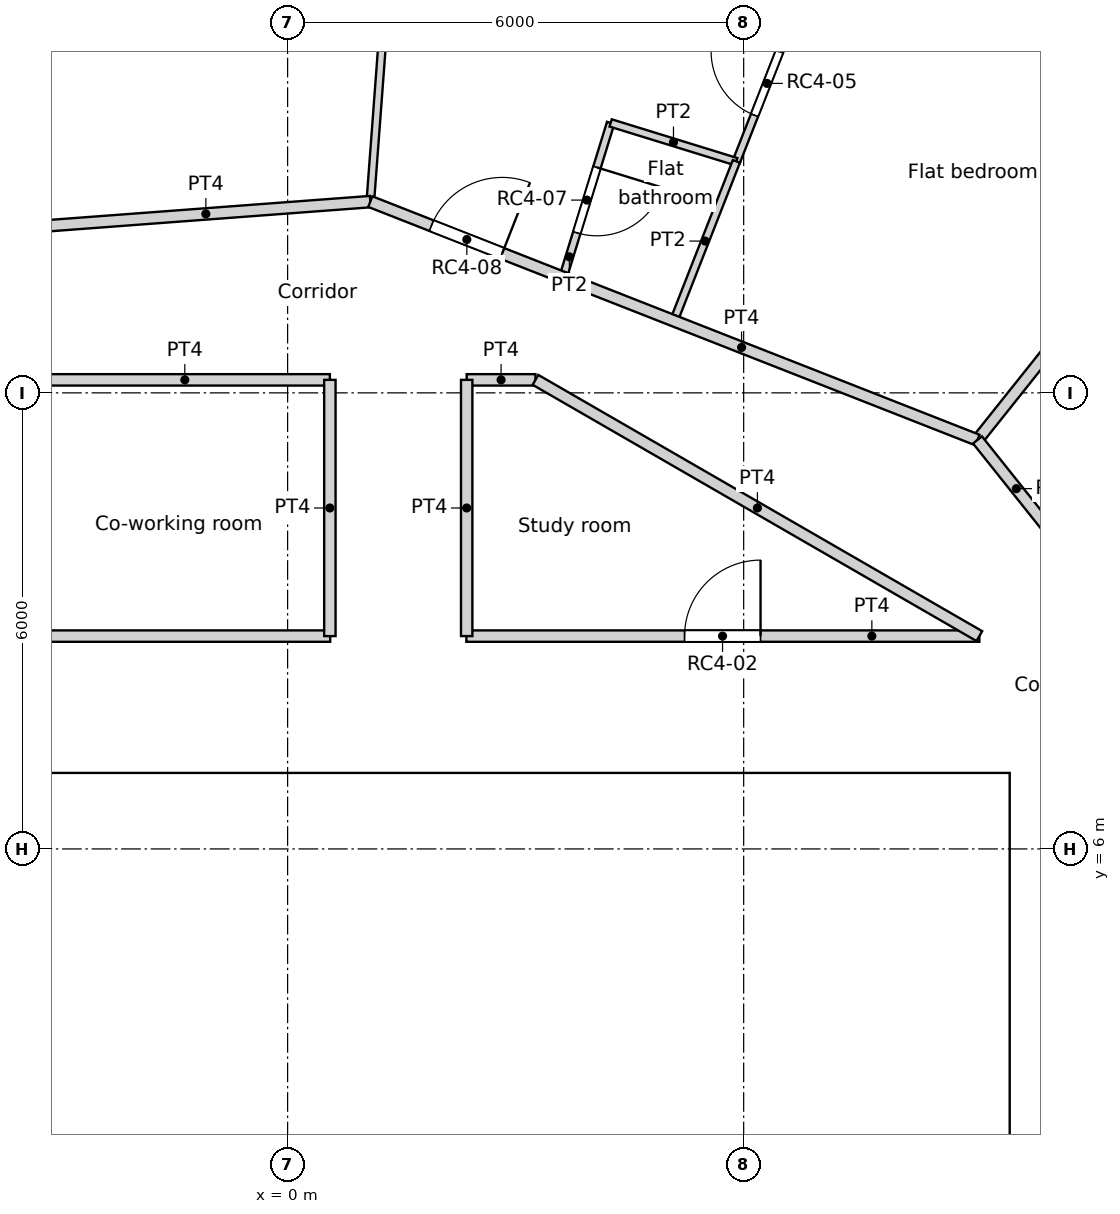
"""IFC4 building model, lengths in metres.
Left out: names, types, materials, properties, quantities, classifications, styles, units other than length and angle.
Written with IfcOpenShell. Run it as: python <this file> out.ifc"""

import sys

from ifc_helpers import new_model, si_unit, direction, frame, frame_2d, origin, origin_2d, place, context, subcontext, project, spatial, rectangle, circle, extrude, element, fill, save


model = new_model("IFC4")
c1 = context("Model", 3, precision=1e-05, world=origin(), true_north=direction((0.0, 1.0)))
c2 = subcontext(c1, "Body", "Model", "MODEL_VIEW")
j1 = project(units=[si_unit("LENGTHUNIT", "METRE"), si_unit("PLANEANGLEUNIT", "RADIAN")], contexts=[c1])
p1 = place(None, origin())
s1 = spatial("IfcSite", under=j1, at=p1, CompositionType="ELEMENT")
p2 = place(p1, origin())
s2 = spatial("IfcBuilding", under=s1, at=p2, CompositionType="ELEMENT")
p3 = place(p2, frame((0.0, 0.0, 263.4)))
s3 = spatial("IfcBuildingStorey", under=s2, at=p3, CompositionType="ELEMENT", Elevation=263.4)
p4 = place(p3, frame((12.754, 16.044, -0.35), z_axis=(0.0, 0.0, 1.0), x_axis=(-0.826246281157, 0.563309047392, 0.0)))
e1 = element("IfcWall", 1, at=p4, inside=s3, PredefinedType="ELEMENTEDWALL", context=c2, shape_type="SweptSolid", body=[
    extrude(rectangle(XDim=3.0, YDim=1.45, at=frame_2d((1.5, 0.0))), origin(), (0.0, 0.0, 1.0), 3.6),
])
p5 = place(p4, frame((1.5, 0.0, 1.9)))
e2 = element("IfcOpeningElement", 2, at=p5, cuts=e1, PredefinedType="OPENING", context=c2, shape_type="SweptSolid", body=[
    extrude(circle(Radius=0.9, at=origin_2d()), frame((0.0, 0.735, 0.0), z_axis=(0.0, -1.0, 0.0), x_axis=(1.0, 0.0, 0.0)), (0.0, 0.0, 1.0), 1.47),
])
p6 = place(p3, frame((-9.5, 6.7, 0.0), z_axis=(0.0, 0.0, 1.0), x_axis=(1.0, 0.0, 0.0)))
e3 = element("IfcWall", 3, at=p6, inside=s3, PredefinedType="SOLIDWALL", context=c2, shape_type="SweptSolid", body=[
    extrude(rectangle(XDim=19.0, YDim=0.6, at=frame_2d((9.5, 0.0))), origin(), (0.0, 0.0, 1.0), 3.6),
])
p7 = place(p6, frame((5.35, 0.0, 0.0)))
e4 = element("IfcOpeningElement", 4, at=p7, cuts=e3, PredefinedType="OPENING", context=c2, shape_type="SweptSolid", body=[
    extrude(rectangle(XDim=1.7, YDim=2.1, at=frame_2d((0.85, 1.05))), frame((0.0, 0.3, 0.0), z_axis=(0.0, -1.0, 0.0), x_axis=(1.0, 0.0, 0.0)), (0.0, 0.0, 1.0), 0.6),
])
p8 = place(p3, frame((9.2, -6.4, 0.0), z_axis=(0.0, 0.0, 1.0), x_axis=(0.0, 1.0, 0.0)))
e5 = element("IfcWall", 5, at=p8, inside=s3, PredefinedType="SOLIDWALL", context=c2, shape_type="SweptSolid", body=[
    extrude(rectangle(XDim=12.8, YDim=0.6, at=frame_2d((6.4, 0.0))), origin(), (0.0, 0.0, 1.0), 3.6),
])
p9 = place(p8, frame((6.4, 0.0, 0.0)))
e6 = element("IfcOpeningElement", 6, at=p9, cuts=e5, PredefinedType="OPENING", context=c2, shape_type="SweptSolid", body=[
    extrude(rectangle(XDim=1.8, YDim=2.1, at=frame_2d((0.9, 1.05))), frame((0.0, 0.3, 0.0), z_axis=(0.0, -1.0, 0.0), x_axis=(1.0, 0.0, 0.0)), (0.0, 0.0, 1.0), 0.6),
])
p10 = place(p3, frame((-4.35, 3.1, 0.0), z_axis=(0.0, 0.0, 1.0), x_axis=(1.0, 0.0, 0.0)))
e7 = element("IfcWall", 7, at=p10, inside=s3, PredefinedType="SOLIDWALL", context=c2, shape_type="SweptSolid", body=[
    extrude(rectangle(XDim=13.25, YDim=0.3, at=frame_2d((6.625, 0.0))), origin(), (0.0, 0.0, 1.0), 3.25),
])
p11 = place(p10, frame((2.95, 0.0, 0.0)))
e8 = element("IfcOpeningElement", 8, at=p11, cuts=e7, PredefinedType="OPENING", context=c2, shape_type="SweptSolid", body=[
    extrude(rectangle(XDim=1.1, YDim=2.1, at=frame_2d((0.55, 1.05))), frame((0.0, 0.15, 0.0), z_axis=(0.0, -1.0, 0.0), x_axis=(1.0, 0.0, 0.0)), (0.0, 0.0, 1.0), 0.3),
])
p12 = place(p10, frame((5.75, 0.0, 0.0)))
e9 = element("IfcOpeningElement", 9, at=p12, cuts=e7, PredefinedType="OPENING", context=c2, shape_type="SweptSolid", body=[
    extrude(rectangle(XDim=1.1, YDim=2.1, at=frame_2d((0.55, 1.05))), frame((0.0, 0.15, 0.0), z_axis=(0.0, -1.0, 0.0), x_axis=(1.0, 0.0, 0.0)), (0.0, 0.0, 1.0), 0.3),
])
p13 = place(p10, frame((8.55, 0.0, 0.0)))
e10 = element("IfcOpeningElement", 10, at=p13, cuts=e7, PredefinedType="OPENING", context=c2, shape_type="SweptSolid", body=[
    extrude(rectangle(XDim=1.1, YDim=2.1, at=frame_2d((0.55, 1.05))), frame((0.0, 0.15, 0.0), z_axis=(0.0, -1.0, 0.0), x_axis=(1.0, 0.0, 0.0)), (0.0, 0.0, 1.0), 0.3),
])
p14 = place(p3, frame((-2.25, -2.95, 0.0), z_axis=(0.0, 0.0, 1.0), x_axis=(0.0, 1.0, 0.0)))
e11 = element("IfcWall", 11, at=p14, inside=s3, PredefinedType="SOLIDWALL", context=c2, shape_type="SweptSolid", body=[
    extrude(rectangle(XDim=5.9, YDim=0.15, at=frame_2d((2.95, 0.0))), origin(), (0.0, 0.0, 1.0), 3.25),
])
p15 = place(p14, frame((2.25, 0.0, 0.0)))
e12 = element("IfcOpeningElement", 12, at=p15, cuts=e11, PredefinedType="OPENING", context=c2, shape_type="SweptSolid", body=[
    extrude(rectangle(XDim=1.4, YDim=2.1, at=frame_2d((0.7, 1.05))), frame((0.0, 0.075, 0.0), z_axis=(0.0, -1.0, 0.0), x_axis=(1.0, 0.0, 0.0)), (0.0, 0.0, 1.0), 0.15),
])
for number, where, z_axis, x_axis in (
    (13, (-2.25, 3.25, 0.0), (0.0, 0.0, 1.0), (0.0, 1.0, 0.0)),
    (14, (0.55, 3.25, 0.0), (0.0, 0.0, 1.0), (0.0, 1.0, 0.0)),
    (15, (3.35, 3.25, 0.0), (0.0, 0.0, 1.0), (0.0, 1.0, 0.0)),
    (16, (6.15, 3.25, 0.0), (0.0, 0.0, 1.0), (0.0, 1.0, 0.0)),
):
    element("IfcWall", number, at=place(p3, frame(where, z_axis=z_axis, x_axis=x_axis)), inside=s3, PredefinedType="SOLIDWALL", context=c2, shape_type="SweptSolid", body=[
        extrude(rectangle(XDim=3.15, YDim=0.3, at=frame_2d((1.575, 0.0))), origin(), (0.0, 0.0, 1.0), 3.25),
    ])
p16 = place(p3, frame((-9.103, 8.8, 0.0), z_axis=(0.0, 0.0, 1.0), x_axis=(1.0, 0.0, 0.0)))
e17 = element("IfcWall", 17, at=p16, inside=s3, PredefinedType="PARTITIONING", context=c2, shape_type="SweptSolid", body=[
    extrude(rectangle(XDim=9.663, YDim=0.15, at=frame_2d((4.832, 0.0))), origin(), (0.0, 0.0, 1.0), 3.25),
])
p17 = place(p16, frame((4.332, 0.0, 0.0)))
e18 = element("IfcOpeningElement", 18, at=p17, cuts=e17, PredefinedType="OPENING", context=c2, shape_type="SweptSolid", body=[
    extrude(rectangle(XDim=1.0, YDim=2.04, at=frame_2d((0.5, 1.02))), frame((0.0, 0.075, 0.0), z_axis=(0.0, -1.0, 0.0), x_axis=(1.0, 0.0, 0.0)), (0.0, 0.0, 1.0), 0.15),
])
p18 = place(p3, frame((2.352, 8.8, 0.0), z_axis=(0.0, 0.0, 1.0), x_axis=(1.0, 0.0, 0.0)))
e19 = element("IfcWall", 19, at=p18, inside=s3, PredefinedType="PARTITIONING", context=c2, shape_type="SweptSolid", body=[
    extrude(rectangle(XDim=6.749, YDim=0.15, at=frame_2d((3.374, 0.0))), origin(), (0.0, 0.0, 1.0), 3.25),
])
p19 = place(p18, frame((2.87, 0.0, 0.0)))
e20 = element("IfcOpeningElement", 20, at=p19, cuts=e19, PredefinedType="OPENING", context=c2, shape_type="SweptSolid", body=[
    extrude(rectangle(XDim=1.0, YDim=2.04, at=frame_2d((0.5, 1.02))), frame((0.0, 0.075, 0.0), z_axis=(0.0, -1.0, 0.0), x_axis=(1.0, 0.0, 0.0)), (0.0, 0.0, 1.0), 0.15),
])
p20 = place(p3, frame((0.556, 8.8, 0.0), z_axis=(0.0, 0.0, 1.0), x_axis=(0.0, 1.0, 0.0)))
e21 = element("IfcWall", 21, at=p20, inside=s3, PredefinedType="PARTITIONING", context=c2, shape_type="SweptSolid", body=[
    extrude(rectangle(XDim=3.371, YDim=0.15, at=frame_2d((1.686, 0.0))), origin(), (0.0, 0.0, 1.0), 3.25),
])
p21 = place(p3, frame((-3.261, 12.171, 0.0), z_axis=(0.0, 0.0, 1.0), x_axis=(1.0, 0.0, 0.0)))
e22 = element("IfcWall", 22, at=p21, inside=s3, PredefinedType="PARTITIONING", context=c2, shape_type="SweptSolid", body=[
    extrude(rectangle(XDim=3.817, YDim=0.15, at=frame_2d((1.908, 0.0))), origin(), (0.0, 0.0, 1.0), 3.25),
])
p22 = place(p3, frame((3.261, 12.171, 0.0), z_axis=(0.0, 0.0, 1.0), x_axis=(0.866066809554, -0.499928276245, 0.0)))
e23 = element("IfcWall", 23, at=p22, inside=s3, PredefinedType="PARTITIONING", context=c2, shape_type="SweptSolid", body=[
    extrude(rectangle(XDim=6.743, YDim=0.15, at=frame_2d((3.371, 0.0))), origin(), (0.0, 0.0, 1.0), 3.25),
])
p23 = place(p3, frame((2.356, 12.171, 0.0), z_axis=(0.0, 0.0, 1.0), x_axis=(1.0, 0.0, 0.0)))
e24 = element("IfcWall", 24, at=p23, inside=s3, PredefinedType="PARTITIONING", context=c2, shape_type="SweptSolid", body=[
    extrude(rectangle(XDim=0.905, YDim=0.15, at=frame_2d((0.453, 0.0))), origin(), (0.0, 0.0, 1.0), 3.25),
])
p24 = place(p3, frame((2.356, 8.8, 0.0), z_axis=(0.0, 0.0, 1.0), x_axis=(0.0, 1.0, 0.0)))
e25 = element("IfcWall", 25, at=p24, inside=s3, PredefinedType="PARTITIONING", context=c2, shape_type="SweptSolid", body=[
    extrude(rectangle(XDim=3.371, YDim=0.15, at=frame_2d((1.686, 0.0))), origin(), (0.0, 0.0, 1.0), 3.25),
])
p25 = place(p3, frame((9.076, 11.381, 0.0), z_axis=(0.0, 0.0, 1.0), x_axis=(0.623805208652, -0.781579849829, 0.0)))
e26 = element("IfcWall", 26, at=p25, inside=s3, PredefinedType="PARTITIONING", context=c2, shape_type="SweptSolid", body=[
    extrude(rectangle(XDim=1.64, YDim=0.15, at=frame_2d((0.82, 0.0))), origin(), (0.0, 0.0, 1.0), 3.25),
])
p26 = place(p3, frame((1.088, 14.516, 0.0), z_axis=(0.0, 0.0, 1.0), x_axis=(0.930800934608, -0.365526497168, 0.0)))
e27 = element("IfcWall", 27, at=p26, inside=s3, PredefinedType="PARTITIONING", context=c2, shape_type="SweptSolid", body=[
    extrude(rectangle(XDim=8.581, YDim=0.15, at=frame_2d((4.291, 0.0))), origin(), (0.0, 0.0, 1.0), 3.25),
])
p27 = place(p26, frame((0.864, 0.0, 0.0)))
e28 = element("IfcOpeningElement", 28, at=p27, cuts=e27, PredefinedType="OPENING", context=c2, shape_type="SweptSolid", body=[
    extrude(rectangle(XDim=1.0, YDim=2.1, at=frame_2d((0.5, 1.05))), frame((0.0, 0.075, 0.0), z_axis=(0.0, -1.0, 0.0), x_axis=(1.0, 0.0, 0.0)), (0.0, 0.0, 1.0), 0.15),
])
p28 = place(p3, frame((-3.239, 14.192, 0.0), z_axis=(0.0, 0.0, 1.0), x_axis=(0.997204448067, 0.074721407608, 0.0)))
e29 = element("IfcWall", 29, at=p28, inside=s3, PredefinedType="PARTITIONING", context=c2, shape_type="SweptSolid", body=[
    extrude(rectangle(XDim=4.339, YDim=0.15, at=frame_2d((2.169, 0.0))), origin(), (0.0, 0.0, 1.0), 3.25),
])
p29 = place(p3, frame((9.076, 11.381, 0.0), z_axis=(0.0, 0.0, 1.0), x_axis=(0.623460949534, 0.781854490558, 0.0)))
e30 = element("IfcWall", 30, at=p29, inside=s3, PredefinedType="PARTITIONING", context=c2, shape_type="SweptSolid", body=[
    extrude(rectangle(XDim=5.214, YDim=0.15, at=frame_2d((2.607, 0.0))), origin(), (0.0, 0.0, 1.0), 3.25),
])
p30 = place(p3, frame((5.903, 15.041, 0.0), z_axis=(0.0, 0.0, 1.0), x_axis=(0.36523219083, 0.930916455318, 0.0)))
e31 = element("IfcWall", 31, at=p30, inside=s3, PredefinedType="PARTITIONING", context=c2, shape_type="SweptSolid", body=[
    extrude(rectangle(XDim=3.614, YDim=0.1, at=frame_2d((1.807, 0.0))), origin(), (0.0, 0.0, 1.0), 3.25),
])
p31 = place(p30, frame((0.657, 0.0, 0.0)))
e32 = element("IfcOpeningElement", 32, at=p31, cuts=e31, PredefinedType="OPENING", context=c2, shape_type="SweptSolid", body=[
    extrude(rectangle(XDim=0.9, YDim=2.1, at=frame_2d((0.45, 1.05))), frame((0.0, 0.05, 0.0), z_axis=(0.0, -1.0, 0.0), x_axis=(1.0, 0.0, 0.0)), (0.0, 0.0, 1.0), 0.1),
])
p32 = place(p3, frame((1.088, 14.516, 0.0), z_axis=(0.0, 0.0, 1.0), x_axis=(0.074816718541, 0.997197301755, 0.0)))
e33 = element("IfcWall", 33, at=p32, inside=s3, PredefinedType="PARTITIONING", context=c2, shape_type="SweptSolid", body=[
    extrude(rectangle(XDim=5.215, YDim=0.1, at=frame_2d((2.607, 0.0))), origin(), (0.0, 0.0, 1.0), 3.25),
])
p33 = place(p32, frame((2.157, 0.0, 0.0)))
e34 = element("IfcOpeningElement", 34, at=p33, cuts=e33, PredefinedType="OPENING", context=c2, shape_type="SweptSolid", body=[
    extrude(rectangle(XDim=0.9, YDim=2.1, at=frame_2d((0.45, 1.05))), frame((0.0, 0.05, 0.0), z_axis=(0.0, -1.0, 0.0), x_axis=(1.0, 0.0, 0.0)), (0.0, 0.0, 1.0), 0.1),
])
p34 = place(p3, frame((4.25, 15.551, 0.0), z_axis=(0.0, 0.0, 1.0), x_axis=(0.955555986234, -0.294809696536, 0.0)))
e35 = element("IfcWall", 35, at=p34, inside=s3, PredefinedType="PARTITIONING", context=c2, shape_type="SweptSolid", body=[
    extrude(rectangle(XDim=1.73, YDim=0.1, at=frame_2d((0.865, 0.0))), origin(), (0.0, 0.0, 1.0), 3.25),
])
p35 = place(p3, frame((3.624, 13.521, 0.0), z_axis=(0.0, 0.0, 1.0), x_axis=(0.294667251911, 0.955599921856, 0.0)))
e36 = element("IfcWall", 36, at=p35, inside=s3, PredefinedType="PARTITIONING", context=c2, shape_type="SweptSolid", body=[
    extrude(rectangle(XDim=2.124, YDim=0.1, at=frame_2d((1.062, 0.0))), origin(), (0.0, 0.0, 1.0), 3.25),
])
p36 = place(p35, frame((0.612, 0.0, 0.0)))
e37 = element("IfcOpeningElement", 37, at=p36, cuts=e36, PredefinedType="OPENING", context=c2, shape_type="SweptSolid", body=[
    extrude(rectangle(XDim=0.9, YDim=2.0, at=frame_2d((0.45, 1.0))), frame((0.0, 0.05, 0.0), z_axis=(0.0, -1.0, 0.0), x_axis=(1.0, 0.0, 0.0)), (0.0, 0.0, 1.0), 0.1),
])
p37 = place(p3, frame((5.082, 12.949, 0.0), z_axis=(0.0, 0.0, 1.0), x_axis=(0.365118857447, 0.930960912142, 0.0)))
e38 = element("IfcWall", 38, at=p37, inside=s3, PredefinedType="PARTITIONING", context=c2, shape_type="SweptSolid", body=[
    extrude(rectangle(XDim=2.251, YDim=0.1, at=frame_2d((1.126, 0.0))), origin(), (0.0, 0.0, 1.0), 3.25),
])
p38 = place(p7, origin())
e39 = element("IfcDoor", 39, at=p38, inside=s3, OperationType="DOUBLE_DOOR_SINGLE_SWING", PredefinedType="DOOR", context=c2, shape_type="SweptSolid", body=[
    extrude(rectangle(XDim=1.7, YDim=2.1, at=frame_2d((0.85, 1.05))), frame((0.0, 0.025, 0.0), z_axis=(0.0, -1.0, 0.0), x_axis=(1.0, 0.0, 0.0)), (0.0, 0.0, 1.0), 0.05),
])
fill(e4, e39)
p39 = place(p11, origin())
e40 = element("IfcDoor", 40, at=p39, inside=s3, OperationType="SLIDING_TO_LEFT", PredefinedType="DOOR", context=c2, shape_type="SweptSolid", body=[
    extrude(rectangle(XDim=1.1, YDim=2.1, at=frame_2d((0.55, 1.05))), frame((0.0, 0.025, 0.0), z_axis=(0.0, -1.0, 0.0), x_axis=(1.0, 0.0, 0.0)), (0.0, 0.0, 1.0), 0.05),
])
fill(e8, e40)
p40 = place(p12, origin())
e41 = element("IfcDoor", 41, at=p40, inside=s3, OperationType="SLIDING_TO_RIGHT", PredefinedType="DOOR", context=c2, shape_type="SweptSolid", body=[
    extrude(rectangle(XDim=1.1, YDim=2.1, at=frame_2d((0.55, 1.05))), frame((0.0, 0.025, 0.0), z_axis=(0.0, -1.0, 0.0), x_axis=(1.0, 0.0, 0.0)), (0.0, 0.0, 1.0), 0.05),
])
fill(e9, e41)
p41 = place(p13, origin())
e42 = element("IfcDoor", 42, at=p41, inside=s3, OperationType="SLIDING_TO_LEFT", PredefinedType="DOOR", context=c2, shape_type="SweptSolid", body=[
    extrude(rectangle(XDim=1.1, YDim=2.1, at=frame_2d((0.55, 1.05))), frame((0.0, 0.025, 0.0), z_axis=(0.0, -1.0, 0.0), x_axis=(1.0, 0.0, 0.0)), (0.0, 0.0, 1.0), 0.05),
])
fill(e10, e42)
p42 = place(p19, origin())
e43 = element("IfcDoor", 43, at=p42, inside=s3, OperationType="SINGLE_SWING_RIGHT", PredefinedType="DOOR", context=c2, shape_type="SweptSolid", body=[
    extrude(rectangle(XDim=1.0, YDim=2.04, at=frame_2d((0.5, 1.02))), frame((0.0, 0.025, 0.0), z_axis=(0.0, -1.0, 0.0), x_axis=(1.0, 0.0, 0.0)), (0.0, 0.0, 1.0), 0.05),
])
fill(e20, e43)
p43 = place(p31, origin())
e44 = element("IfcDoor", 44, at=p43, inside=s3, OperationType="SINGLE_SWING_RIGHT", PredefinedType="DOOR", context=c2, shape_type="SweptSolid", body=[
    extrude(rectangle(XDim=0.9, YDim=2.1, at=frame_2d((0.45, 1.05))), frame((0.0, 0.025, 0.0), z_axis=(0.0, -1.0, 0.0), x_axis=(1.0, 0.0, 0.0)), (0.0, 0.0, 1.0), 0.05),
])
fill(e32, e44)
p44 = place(p36, origin())
e45 = element("IfcDoor", 45, at=p44, inside=s3, OperationType="SINGLE_SWING_LEFT", PredefinedType="DOOR", context=c2, shape_type="SweptSolid", body=[
    extrude(rectangle(XDim=0.9, YDim=2.0, at=frame_2d((0.45, 1.0))), frame((0.0, 0.025, 0.0), z_axis=(0.0, -1.0, 0.0), x_axis=(1.0, 0.0, 0.0)), (0.0, 0.0, 1.0), 0.05),
])
fill(e37, e45)
p45 = place(p27, origin())
e46 = element("IfcDoor", 46, at=p45, inside=s3, OperationType="SINGLE_SWING_RIGHT", PredefinedType="DOOR", context=c2, shape_type="SweptSolid", body=[
    extrude(rectangle(XDim=1.0, YDim=2.1, at=frame_2d((0.5, 1.05))), frame((0.0, 0.025, 0.0), z_axis=(0.0, -1.0, 0.0), x_axis=(1.0, 0.0, 0.0)), (0.0, 0.0, 1.0), 0.05),
])
fill(e28, e46)
save(model, sys.argv[1])
